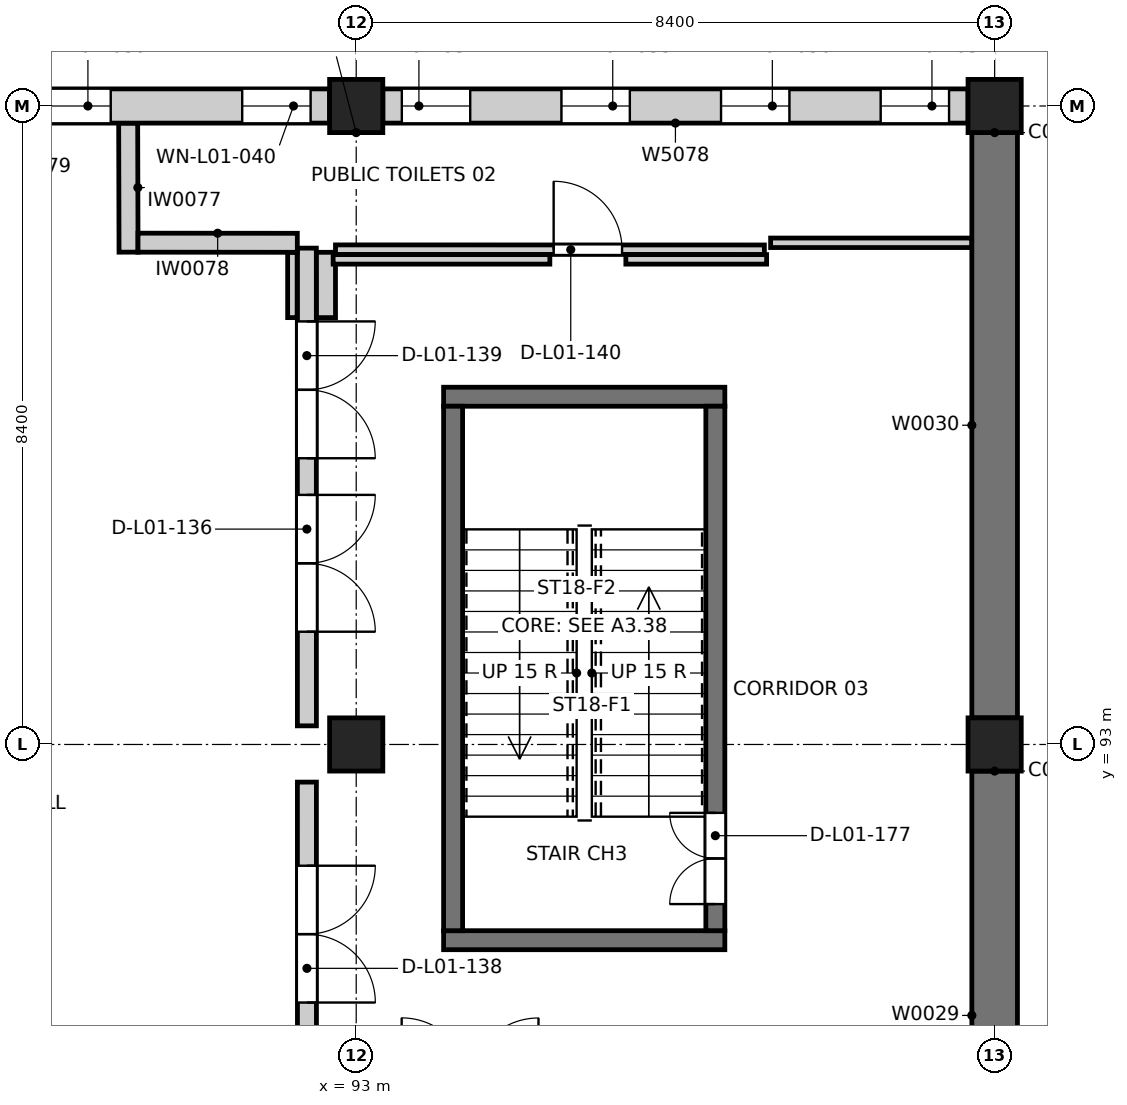
"""IFC4 building model, lengths in metres.
Left out: names, types, materials, properties, quantities, classifications, styles, units other than length and angle.
Written with IfcOpenShell. Run it as: python <this file> out.ifc"""

import sys

from ifc_helpers import new_model, si_unit, direction, frame, frame_2d, origin, origin_2d, place, context, subcontext, project, spatial, rectangle, extrude, element, fill, save


model = new_model("IFC4")
c1 = context("Model", 3, precision=1e-05, world=origin(), true_north=direction((0.0, 1.0)))
c2 = subcontext(c1, "Body", "Model", "MODEL_VIEW")
j1 = project(units=[si_unit("LENGTHUNIT", "METRE"), si_unit("PLANEANGLEUNIT", "RADIAN")], contexts=[c1])
p1 = place(None, origin())
s1 = spatial("IfcSite", under=j1, at=p1, CompositionType="ELEMENT")
p2 = place(p1, origin())
s2 = spatial("IfcBuilding", under=s1, at=p2, CompositionType="ELEMENT")
p3 = place(p2, frame((0.0, 0.0, 4.8)))
s3 = spatial("IfcBuildingStorey", under=s2, at=p3, CompositionType="ELEMENT", Elevation=4.8)
for number, where, z_axis, x_axis in (
    (1, (93.0, 93.0, 0.0), (0.0, 0.0, 1.0), (1.0, 0.0, 0.0)),
    (2, (93.0, 101.4, 0.0), (0.0, 0.0, 1.0), (1.0, 0.0, 0.0)),
    (3, (101.4, 93.0, 0.0), (0.0, 0.0, 1.0), (1.0, 0.0, 0.0)),
    (4, (101.4, 101.4, 0.0), (0.0, 0.0, 1.0), (1.0, 0.0, 0.0)),
):
    element("IfcColumn", number, at=place(p3, frame(where, z_axis=z_axis, x_axis=x_axis)), inside=s3, PredefinedType="COLUMN", context=c2, shape_type="SweptSolid", body=[
        extrude(rectangle(XDim=0.7, YDim=0.7, at=origin_2d()), origin(), (0.0, 0.0, 1.0), 4.8),
    ])
for number, where, z_axis, x_axis in (
    (5, (101.4, 84.95, 0.0), (0.0, 0.0, 1.0), (0.0, 1.0, 0.0)),
    (6, (101.4, 93.35, 0.0), (0.0, 0.0, 1.0), (0.0, 1.0, 0.0)),
):
    element("IfcWall", number, at=place(p3, frame(where, z_axis=z_axis, x_axis=x_axis)), inside=s3, PredefinedType="SOLIDWALL", context=c2, shape_type="SweptSolid", body=[
        extrude(rectangle(XDim=7.7, YDim=0.6, at=frame_2d((3.85, 0.0))), origin(), (0.0, 0.0, 1.0), 4.8),
    ])
for number, where, z_axis, x_axis in (
    (7, (94.15, 90.425, 0.0), (0.0, 0.0, 1.0), (1.0, 0.0, 0.0)),
    (8, (94.15, 97.575, 0.0), (0.0, 0.0, 1.0), (1.0, 0.0, 0.0)),
):
    element("IfcWall", number, at=place(p3, frame(where, z_axis=z_axis, x_axis=x_axis)), inside=s3, PredefinedType="SOLIDWALL", context=c2, shape_type="SweptSolid", body=[
        extrude(rectangle(XDim=3.7, YDim=0.25, at=frame_2d((1.85, 0.0))), origin(), (0.0, 0.0, 1.0), 4.8),
    ])
p4 = place(p3, frame((94.275, 90.55, 0.0), z_axis=(0.0, 0.0, 1.0), x_axis=(0.0, 1.0, 0.0)))
e9 = element("IfcWall", 9, at=p4, inside=s3, PredefinedType="SOLIDWALL", context=c2, shape_type="SweptSolid", body=[
    extrude(rectangle(XDim=6.9, YDim=0.25, at=frame_2d((3.45, 0.0))), origin(), (0.0, 0.0, 1.0), 4.8),
])
p5 = place(p3, frame((97.725, 90.55, 0.0), z_axis=(0.0, 0.0, 1.0), x_axis=(0.0, 1.0, 0.0)))
e10 = element("IfcWall", 10, at=p5, inside=s3, PredefinedType="SOLIDWALL", context=c2, shape_type="SweptSolid", body=[
    extrude(rectangle(XDim=6.9, YDim=0.25, at=frame_2d((3.45, 0.0))), origin(), (0.0, 0.0, 1.0), 4.8),
])
p6 = place(p5, frame((0.35, 0.0, 0.0)))
e11 = element("IfcOpeningElement", 11, at=p6, cuts=e10, PredefinedType="OPENING", context=c2, shape_type="SweptSolid", body=[
    extrude(rectangle(XDim=1.2, YDim=2.1, at=frame_2d((0.6, 1.05))), frame((0.0, 0.135, 0.0), z_axis=(0.0, -1.0, 0.0), x_axis=(1.0, 0.0, 0.0)), (0.0, 0.0, 1.0), 0.27),
])
p7 = place(p3, frame((92.35, 99.53, 0.0), z_axis=(0.0, 0.0, 1.0), x_axis=(0.000155382044, -0.999999987928, 0.0)))
e12 = element("IfcWall", 12, at=p7, inside=s3, PredefinedType="PARTITIONING", context=c2, shape_type="SweptSolid", body=[
    extrude(rectangle(XDim=6.285, YDim=0.25, at=frame_2d((3.143, 0.0))), origin(), (0.0, 0.0, 1.0), 3.8),
])
p8 = place(p7, frame((3.247, 0.0, 0.0)))
e13 = element("IfcOpeningElement", 13, at=p8, cuts=e12, PredefinedType="OPENING", context=c2, shape_type="SweptSolid", body=[
    extrude(rectangle(XDim=1.8, YDim=2.4, at=frame_2d((0.9, 1.2))), frame((0.0, 0.135, 0.0), z_axis=(0.0, -1.0, 0.0), x_axis=(1.0, 0.0, 0.0)), (0.0, 0.0, 1.0), 0.27),
])
p9 = place(p7, frame((0.964, 0.0, 0.0)))
e14 = element("IfcOpeningElement", 14, at=p9, cuts=e12, PredefinedType="OPENING", context=c2, shape_type="SweptSolid", body=[
    extrude(rectangle(XDim=1.8, YDim=2.4, at=frame_2d((0.9, 1.2))), frame((0.0, 0.135, 0.0), z_axis=(0.0, -1.0, 0.0), x_axis=(1.0, 0.0, 0.0)), (0.0, 0.0, 1.0), 0.27),
])
p10 = place(p3, frame((92.351, 92.505, 0.0), z_axis=(0.0, 0.0, 1.0), x_axis=(0.000236686384, -0.99999997199, 0.0)))
e15 = element("IfcWall", 15, at=p10, inside=s3, PredefinedType="PARTITIONING", context=c2, shape_type="SweptSolid", body=[
    extrude(rectangle(XDim=4.126, YDim=0.25, at=frame_2d((2.063, 0.0))), origin(), (0.0, 0.0, 1.0), 3.9),
])
p11 = place(p10, frame((1.1, 0.0, 0.0)))
e16 = element("IfcOpeningElement", 16, at=p11, cuts=e15, PredefinedType="OPENING", context=c2, shape_type="SweptSolid", body=[
    extrude(rectangle(XDim=1.8, YDim=2.4, at=frame_2d((0.9, 1.2))), frame((0.0, 0.135, 0.0), z_axis=(0.0, -1.0, 0.0), x_axis=(1.0, 0.0, 0.0)), (0.0, 0.0, 1.0), 0.27),
])
p12 = place(p3, frame((90.0, 101.175, 0.0), z_axis=(0.0, 0.0, 1.0), x_axis=(0.002732230239, -0.999996267452, 0.0)))
e17 = element("IfcWall", 17, at=p12, inside=s3, PredefinedType="PARTITIONING", context=c2, shape_type="SweptSolid", body=[
    extrude(rectangle(XDim=1.698, YDim=0.25, at=frame_2d((0.849, 0.0))), origin(), (0.0, 0.0, 1.0), 4.6),
])
p13 = place(p3, frame((90.129, 99.602, 0.0), z_axis=(0.0, 0.0, 1.0), x_axis=(0.999999667659, -0.000815280419, 0.0)))
e18 = element("IfcWall", 18, at=p13, inside=s3, PredefinedType="PARTITIONING", context=c2, shape_type="SweptSolid", body=[
    extrude(rectangle(XDim=2.096, YDim=0.25, at=frame_2d((1.048, 0.0))), origin(), (0.0, 0.0, 1.0), 4.6),
])
p14 = place(p3, frame((92.602, 99.475, 0.0), z_axis=(0.0, 0.0, 1.0), x_axis=(0.000568181726, -0.999999838585, 0.0)))
e19 = element("IfcWall", 19, at=p14, inside=s3, PredefinedType="PARTITIONING", context=c2, shape_type="SweptSolid", body=[
    extrude(rectangle(XDim=0.859, YDim=0.25, at=frame_2d((0.43, 0.0))), origin(), (0.0, 0.0, 1.0), 3.8),
])
p15 = place(p3, frame((92.16, 98.616, 0.0), z_axis=(0.0, 0.0, 1.0), x_axis=(0.0, 1.0, 0.0)))
e20 = element("IfcWall", 20, at=p15, inside=s3, PredefinedType="PARTITIONING", context=c2, shape_type="SweptSolid", body=[
    extrude(rectangle(XDim=0.857, YDim=0.125, at=frame_2d((0.428, 0.0))), origin(), (0.0, 0.0, 1.0), 3.9),
])
p16 = place(p3, frame((92.728, 99.51, 0.0), z_axis=(0.0, 0.0, 1.0), x_axis=(0.999999985023, -0.000173070264, 0.0)))
e21 = element("IfcWall", 21, at=p16, inside=s3, PredefinedType="PARTITIONING", context=c2, shape_type="SweptSolid", body=[
    extrude(rectangle(XDim=5.643, YDim=0.125, at=frame_2d((2.821, 0.0))), origin(), (0.0, 0.0, 1.0), 3.8),
])
p17 = place(p16, frame((2.87, 0.0, 0.0)))
e22 = element("IfcOpeningElement", 22, at=p17, cuts=e21, PredefinedType="OPENING", context=c2, shape_type="SweptSolid", body=[
    extrude(rectangle(XDim=0.9, YDim=2.1, at=frame_2d((0.45, 1.05))), frame((0.0, 0.073, 0.0), z_axis=(0.0, -1.0, 0.0), x_axis=(1.0, 0.0, 0.0)), (0.0, 0.0, 1.0), 0.145),
])
p18 = place(p3, frame((98.452, 99.6, 0.0), z_axis=(0.0, 0.0, 1.0), x_axis=(1.0, 0.0, 0.0)))
e23 = element("IfcWall", 23, at=p18, inside=s3, PredefinedType="PARTITIONING", context=c2, shape_type="SweptSolid", body=[
    extrude(rectangle(XDim=2.648, YDim=0.125, at=frame_2d((1.324, 0.0))), origin(), (0.0, 0.0, 1.0), 4.6),
])
p19 = place(p3, frame((95.548, 99.382, 0.0), z_axis=(0.0, 0.0, 1.0), x_axis=(-1.0, 0.0, 0.0)))
e24 = element("IfcWall", 24, at=p19, inside=s3, PredefinedType="PARTITIONING", context=c2, shape_type="SweptSolid", body=[
    extrude(rectangle(XDim=2.851, YDim=0.125, at=frame_2d((1.426, 0.0))), origin(), (0.0, 0.0, 1.0), 3.8),
])
p20 = place(p3, frame((101.05, 101.4, 0.0), z_axis=(0.0, 0.0, 1.0), x_axis=(-1.0, 0.0, 0.0)))
e25 = element("IfcWall", 25, at=p20, inside=s3, PredefinedType="SOLIDWALL", context=c2, shape_type="SweptSolid", body=[
    extrude(rectangle(XDim=7.7, YDim=0.45, at=frame_2d((3.85, 0.0))), origin(), (0.0, 0.0, 1.0), 3.8),
])
p21 = place(p20, frame((6.55, 0.0, 1.8)))
e26 = element("IfcOpeningElement", 26, at=p21, cuts=e25, PredefinedType="OPENING", context=c2, shape_type="SweptSolid", body=[
    extrude(rectangle(XDim=0.9, YDim=0.6, at=frame_2d((0.45, 0.3))), frame((0.0, 0.235, 0.0), z_axis=(0.0, -1.0, 0.0), x_axis=(1.0, 0.0, 0.0)), (0.0, 0.0, 1.0), 0.47),
])
p22 = place(p20, frame((4.45, 0.0, 1.8)))
e27 = element("IfcOpeningElement", 27, at=p22, cuts=e25, PredefinedType="OPENING", context=c2, shape_type="SweptSolid", body=[
    extrude(rectangle(XDim=0.9, YDim=0.6, at=frame_2d((0.45, 0.3))), frame((0.0, 0.235, 0.0), z_axis=(0.0, -1.0, 0.0), x_axis=(1.0, 0.0, 0.0)), (0.0, 0.0, 1.0), 0.47),
])
p23 = place(p20, frame((2.35, 0.0, 1.8)))
e28 = element("IfcOpeningElement", 28, at=p23, cuts=e25, PredefinedType="OPENING", context=c2, shape_type="SweptSolid", body=[
    extrude(rectangle(XDim=0.9, YDim=0.6, at=frame_2d((0.45, 0.3))), frame((0.0, 0.235, 0.0), z_axis=(0.0, -1.0, 0.0), x_axis=(1.0, 0.0, 0.0)), (0.0, 0.0, 1.0), 0.47),
])
p24 = place(p20, frame((0.25, 0.0, 1.8)))
e29 = element("IfcOpeningElement", 29, at=p24, cuts=e25, PredefinedType="OPENING", context=c2, shape_type="SweptSolid", body=[
    extrude(rectangle(XDim=0.9, YDim=0.6, at=frame_2d((0.45, 0.3))), frame((0.0, 0.235, 0.0), z_axis=(0.0, -1.0, 0.0), x_axis=(1.0, 0.0, 0.0)), (0.0, 0.0, 1.0), 0.47),
])
p25 = place(p3, frame((92.65, 101.4, 0.0), z_axis=(0.0, 0.0, 1.0), x_axis=(-1.0, 0.0, 0.0)))
e30 = element("IfcWall", 30, at=p25, inside=s3, PredefinedType="SOLIDWALL", context=c2, shape_type="SweptSolid", body=[
    extrude(rectangle(XDim=7.7, YDim=0.45, at=frame_2d((3.85, 0.0))), origin(), (0.0, 0.0, 1.0), 3.8),
])
p26 = place(p25, frame((4.33, 0.0, 0.9)))
e31 = element("IfcOpeningElement", 31, at=p26, cuts=e30, PredefinedType="OPENING", context=c2, shape_type="SweptSolid", body=[
    extrude(rectangle(XDim=1.2, YDim=2.4, at=frame_2d((0.6, 1.2))), frame((0.0, 0.235, 0.0), z_axis=(0.0, -1.0, 0.0), x_axis=(1.0, 0.0, 0.0)), (0.0, 0.0, 1.0), 0.47),
])
p27 = place(p25, frame((2.88, 0.0, 0.9)))
e32 = element("IfcOpeningElement", 32, at=p27, cuts=e30, PredefinedType="OPENING", context=c2, shape_type="SweptSolid", body=[
    extrude(rectangle(XDim=1.2, YDim=2.4, at=frame_2d((0.6, 1.2))), frame((0.0, 0.235, 0.0), z_axis=(0.0, -1.0, 0.0), x_axis=(1.0, 0.0, 0.0)), (0.0, 0.0, 1.0), 0.47),
])
p28 = place(p25, frame((0.25, 0.0, 1.8)))
e33 = element("IfcOpeningElement", 33, at=p28, cuts=e30, PredefinedType="OPENING", context=c2, shape_type="SweptSolid", body=[
    extrude(rectangle(XDim=0.9, YDim=0.6, at=frame_2d((0.45, 0.3))), frame((0.0, 0.235, 0.0), z_axis=(0.0, -1.0, 0.0), x_axis=(1.0, 0.0, 0.0)), (0.0, 0.0, 1.0), 0.47),
])
p29 = place(p3, frame((98.4, 99.382, 0.0), z_axis=(0.0, 0.0, 1.0), x_axis=(-1.0, 0.0, 0.0)))
e34 = element("IfcWall", 34, at=p29, inside=s3, PredefinedType="PARTITIONING", context=c2, shape_type="SweptSolid", body=[
    extrude(rectangle(XDim=1.852, YDim=0.125, at=frame_2d((0.926, 0.0))), origin(), (0.0, 0.0, 1.0), 3.8),
])
p30 = place(p8, origin())
e35 = element("IfcDoor", 35, at=p30, inside=s3, OperationType="DOUBLE_DOOR_SINGLE_SWING", PredefinedType="DOOR", context=c2, shape_type="SweptSolid", body=[
    extrude(rectangle(XDim=1.8, YDim=2.4, at=frame_2d((0.9, 1.2))), frame((0.0, 0.025, 0.0), z_axis=(0.0, -1.0, 0.0), x_axis=(1.0, 0.0, 0.0)), (0.0, 0.0, 1.0), 0.05),
])
fill(e13, e35)
p31 = place(p11, origin())
e36 = element("IfcDoor", 36, at=p31, inside=s3, OperationType="DOUBLE_DOOR_SINGLE_SWING", PredefinedType="DOOR", context=c2, shape_type="SweptSolid", body=[
    extrude(rectangle(XDim=1.8, YDim=2.4, at=frame_2d((0.9, 1.2))), frame((0.0, 0.025, 0.0), z_axis=(0.0, -1.0, 0.0), x_axis=(1.0, 0.0, 0.0)), (0.0, 0.0, 1.0), 0.05),
])
fill(e16, e36)
p32 = place(p9, origin())
e37 = element("IfcDoor", 37, at=p32, inside=s3, OperationType="DOUBLE_DOOR_SINGLE_SWING", PredefinedType="DOOR", context=c2, shape_type="SweptSolid", body=[
    extrude(rectangle(XDim=1.8, YDim=2.4, at=frame_2d((0.9, 1.2))), frame((0.0, 0.025, 0.0), z_axis=(0.0, -1.0, 0.0), x_axis=(1.0, 0.0, 0.0)), (0.0, 0.0, 1.0), 0.05),
])
fill(e14, e37)
p33 = place(p17, origin())
e38 = element("IfcDoor", 38, at=p33, inside=s3, OperationType="SINGLE_SWING_LEFT", PredefinedType="DOOR", context=c2, shape_type="SweptSolid", body=[
    extrude(rectangle(XDim=0.9, YDim=2.1, at=frame_2d((0.45, 1.05))), frame((0.0, 0.025, 0.0), z_axis=(0.0, -1.0, 0.0), x_axis=(1.0, 0.0, 0.0)), (0.0, 0.0, 1.0), 0.05),
])
fill(e22, e38)
p34 = place(p6, origin())
e39 = element("IfcDoor", 39, at=p34, inside=s3, OperationType="DOUBLE_DOOR_SINGLE_SWING", PredefinedType="DOOR", context=c2, shape_type="SweptSolid", body=[
    extrude(rectangle(XDim=1.2, YDim=2.1, at=frame_2d((0.6, 1.05))), frame((0.0, 0.025, 0.0), z_axis=(0.0, -1.0, 0.0), x_axis=(1.0, 0.0, 0.0)), (0.0, 0.0, 1.0), 0.05),
])
fill(e11, e39)
p35 = place(p21, origin())
e40 = element("IfcWindow", 40, at=p35, inside=s3, PartitioningType="SINGLE_PANEL", PredefinedType="WINDOW", context=c2, shape_type="SweptSolid", body=[
    extrude(rectangle(XDim=0.9, YDim=0.6, at=frame_2d((0.45, 0.3))), frame((0.0, 0.035, 0.0), z_axis=(0.0, -1.0, 0.0), x_axis=(1.0, 0.0, 0.0)), (0.0, 0.0, 1.0), 0.06),
])
fill(e26, e40)
p36 = place(p22, origin())
e41 = element("IfcWindow", 41, at=p36, inside=s3, PartitioningType="SINGLE_PANEL", PredefinedType="WINDOW", context=c2, shape_type="SweptSolid", body=[
    extrude(rectangle(XDim=0.9, YDim=0.6, at=frame_2d((0.45, 0.3))), frame((0.0, 0.035, 0.0), z_axis=(0.0, -1.0, 0.0), x_axis=(1.0, 0.0, 0.0)), (0.0, 0.0, 1.0), 0.06),
])
fill(e27, e41)
p37 = place(p23, origin())
e42 = element("IfcWindow", 42, at=p37, inside=s3, PartitioningType="SINGLE_PANEL", PredefinedType="WINDOW", context=c2, shape_type="SweptSolid", body=[
    extrude(rectangle(XDim=0.9, YDim=0.6, at=frame_2d((0.45, 0.3))), frame((0.0, 0.035, 0.0), z_axis=(0.0, -1.0, 0.0), x_axis=(1.0, 0.0, 0.0)), (0.0, 0.0, 1.0), 0.06),
])
fill(e28, e42)
p38 = place(p24, origin())
e43 = element("IfcWindow", 43, at=p38, inside=s3, PartitioningType="SINGLE_PANEL", PredefinedType="WINDOW", context=c2, shape_type="SweptSolid", body=[
    extrude(rectangle(XDim=0.9, YDim=0.6, at=frame_2d((0.45, 0.3))), frame((0.0, 0.035, 0.0), z_axis=(0.0, -1.0, 0.0), x_axis=(1.0, 0.0, 0.0)), (0.0, 0.0, 1.0), 0.06),
])
fill(e29, e43)
p39 = place(p27, origin())
e44 = element("IfcWindow", 44, at=p39, inside=s3, PartitioningType="SINGLE_PANEL", PredefinedType="WINDOW", context=c2, shape_type="SweptSolid", body=[
    extrude(rectangle(XDim=1.2, YDim=2.4, at=frame_2d((0.6, 1.2))), frame((0.0, 0.135, 0.0), z_axis=(0.0, -1.0, 0.0), x_axis=(1.0, 0.0, 0.0)), (0.0, 0.0, 1.0), 0.06),
])
fill(e32, e44)
p40 = place(p28, origin())
e45 = element("IfcWindow", 45, at=p40, inside=s3, PartitioningType="SINGLE_PANEL", PredefinedType="WINDOW", context=c2, shape_type="SweptSolid", body=[
    extrude(rectangle(XDim=0.9, YDim=0.6, at=frame_2d((0.45, 0.3))), frame((0.0, 0.035, 0.0), z_axis=(0.0, -1.0, 0.0), x_axis=(1.0, 0.0, 0.0)), (0.0, 0.0, 1.0), 0.06),
])
fill(e33, e45)
save(model, sys.argv[1])
